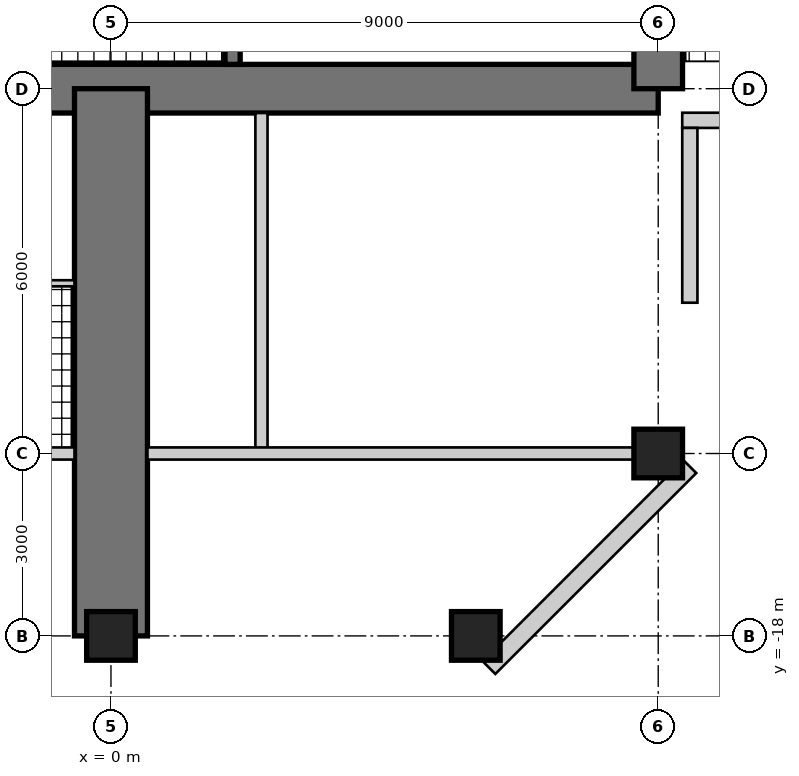
"""IFC4 building model, lengths in metres.
Left out: names, types, materials, properties, quantities, classifications, styles, units other than length and angle.
Written with IfcOpenShell. Run it as: python <this file> out.ifc"""

import sys

from ifc_helpers import new_model, si_unit, direction, frame, frame_2d, origin, origin_2d, place, context, subcontext, project, spatial, rectangle, hollow_rectangle, extrude, element, fill, save


model = new_model("IFC4")
c1 = context("Model", 3, precision=1e-05, world=origin(), true_north=direction((0.0, 1.0)))
c2 = subcontext(c1, "Body", "Model", "MODEL_VIEW")
j1 = project(units=[si_unit("LENGTHUNIT", "METRE"), si_unit("PLANEANGLEUNIT", "RADIAN")], contexts=[c1])
p1 = place(None, origin())
s1 = spatial("IfcSite", under=j1, at=p1, CompositionType="ELEMENT")
p2 = place(p1, origin())
s2 = spatial("IfcBuilding", under=s1, at=p2, CompositionType="ELEMENT")
p3 = place(p2, frame((0.0, 0.0, 242.5)))
s3 = spatial("IfcBuildingStorey", under=s2, at=p3, CompositionType="ELEMENT", Elevation=242.5)
p4 = place(p3, frame((-9.0, -9.0, 0.0), z_axis=(0.0, 0.0, 1.0), x_axis=(1.0, 0.0, 0.0)))
e1 = element("IfcWall", 1, at=p4, inside=s3, PredefinedType="SHEAR", context=c2, shape_type="SweptSolid", body=[
    extrude(rectangle(XDim=18.0, YDim=0.8, at=frame_2d((9.0, 0.0))), origin(), (0.0, 0.0, 1.0), 3.4),
])
p5 = place(p4, frame((9.8, 0.0, 0.0)))
e2 = element("IfcOpeningElement", 2, at=p5, cuts=e1, PredefinedType="OPENING", context=c2, shape_type="SweptSolid", body=[
    extrude(rectangle(XDim=1.0, YDim=2.4, at=frame_2d((0.5, 1.2))), frame((0.0, 0.41, 0.0), z_axis=(0.0, -1.0, 0.0), x_axis=(1.0, 0.0, 0.0)), (0.0, 0.0, 1.0), 0.82),
])
p6 = place(p3, frame((9.0, -9.0, 0.0), z_axis=(0.0, 0.0, 1.0), x_axis=(0.0, 1.0, 0.0)))
e3 = element("IfcWall", 3, at=p6, inside=s3, PredefinedType="SHEAR", context=c2, shape_type="SweptSolid", body=[
    extrude(rectangle(XDim=18.0, YDim=0.8, at=frame_2d((9.0, 0.0))), origin(), (0.0, 0.0, 1.0), 3.4),
])
p7 = place(p6, frame((9.8, 0.0, 0.0)))
e4 = element("IfcOpeningElement", 4, at=p7, cuts=e3, PredefinedType="OPENING", context=c2, shape_type="SweptSolid", body=[
    extrude(rectangle(XDim=1.0, YDim=2.4, at=frame_2d((0.5, 1.2))), frame((0.0, 0.41, 0.0), z_axis=(0.0, -1.0, 0.0), x_axis=(1.0, 0.0, 0.0)), (0.0, 0.0, 1.0), 0.82),
])
p8 = place(p3, frame((2.0, -1.675, 0.0), z_axis=(0.0, 0.0, 1.0), x_axis=(0.0, -1.0, 0.0)))
e5 = element("IfcWall", 5, at=p8, inside=s3, PredefinedType="SHEAR", context=c2, shape_type="SweptSolid", body=[
    extrude(rectangle(XDim=6.925, YDim=0.25, at=frame_2d((3.462, 0.0))), origin(), (0.0, 0.0, 1.0), 3.4),
])
p9 = place(p8, frame((0.725, 0.0, 0.0)))
e6 = element("IfcOpeningElement", 6, at=p9, cuts=e5, PredefinedType="OPENING", context=c2, shape_type="SweptSolid", body=[
    extrude(rectangle(XDim=1.0, YDim=2.1, at=frame_2d((0.5, 1.05))), frame((0.0, 0.135, 0.0), z_axis=(0.0, -1.0, 0.0), x_axis=(1.0, 0.0, 0.0)), (0.0, 0.0, 1.0), 0.27),
])
p10 = place(p3, frame((0.0, -9.0, 0.0), z_axis=(0.0, 0.0, 1.0), x_axis=(0.0, -1.0, 0.0)))
e7 = element("IfcWall", 7, at=p10, inside=s3, PredefinedType="SHEAR", context=c2, shape_type="SweptSolid", body=[
    extrude(rectangle(XDim=9.0, YDim=1.2, at=frame_2d((4.5, 0.0))), origin(), (0.0, 0.0, 1.0), 3.4),
])
p11 = place(p10, frame((3.8, 0.0, 0.0)))
e8 = element("IfcOpeningElement", 8, at=p11, cuts=e7, PredefinedType="OPENING", context=c2, shape_type="SweptSolid", body=[
    extrude(rectangle(XDim=1.0, YDim=2.15, at=frame_2d((0.5, 1.075))), frame((0.0, 0.61, 0.0), z_axis=(0.0, -1.0, 0.0), x_axis=(1.0, 0.0, 0.0)), (0.0, 0.0, 1.0), 1.22),
])
p12 = place(p10, frame((7.0, 0.0, 0.0)))
e9 = element("IfcOpeningElement", 9, at=p12, cuts=e7, PredefinedType="OPENING", context=c2, shape_type="SweptSolid", body=[
    extrude(rectangle(XDim=1.0, YDim=2.2, at=frame_2d((0.5, 1.1))), frame((0.0, 0.61, 0.0), z_axis=(0.0, -1.0, 0.0), x_axis=(1.0, 0.0, 0.0)), (0.0, 0.0, 1.0), 1.22),
])
for number, where, z_axis, x_axis in (
    (10, (9.0, -15.0, 0.0), (0.0, 0.0, 1.0), (1.0, 0.0, 0.0)),
    (11, (0.0, -18.0, 0.0), (0.0, 0.0, 1.0), (1.0, 0.0, 0.0)),
    (12, (6.0, -18.0, 0.0), (0.0, 0.0, 1.0), (1.0, 0.0, 0.0)),
):
    element("IfcColumn", number, at=place(p3, frame(where, z_axis=z_axis, x_axis=x_axis)), inside=s3, PredefinedType="COLUMN", context=c2, shape_type="SweptSolid", body=[
        extrude(rectangle(XDim=0.8, YDim=0.8, at=origin_2d()), origin(), (0.0, 0.0, 1.0), 3.4),
    ])
p13 = place(p3, frame((9.395, -9.52, 0.0), z_axis=(0.0, 0.0, 1.0), x_axis=(1.0, 0.0, 0.0)))
e13 = element("IfcWall", 13, at=p13, inside=s3, PredefinedType="SOLIDWALL", context=c2, shape_type="SweptSolid", body=[
    extrude(rectangle(XDim=3.125, YDim=0.25, at=frame_2d((1.562, 0.0))), origin(), (0.0, 0.0, 1.0), 3.22),
])
p14 = place(p13, frame((0.6, 0.0, 0.0)))
e14 = element("IfcOpeningElement", 14, at=p14, cuts=e13, PredefinedType="OPENING", context=c2, shape_type="SweptSolid", body=[
    extrude(rectangle(XDim=1.0, YDim=2.2, at=frame_2d((0.5, 1.1))), frame((0.0, 0.135, 0.0), z_axis=(0.0, -1.0, 0.0), x_axis=(1.0, 0.0, 0.0)), (0.0, 0.0, 1.0), 0.27),
])
p15 = place(p3, frame((6.215, -18.52, 0.0), z_axis=(0.0, 0.0, 1.0), x_axis=(0.707106781187, 0.707106781187, 0.0)))
e15 = element("IfcWall", 15, at=p15, inside=s3, PredefinedType="SOLIDWALL", context=c2, shape_type="SweptSolid", body=[
    extrude(rectangle(XDim=4.674, YDim=0.3, at=frame_2d((2.337, 0.0))), origin(), (0.0, 0.0, 1.0), 3.22),
])
p16 = place(p15, frame((1.887, 0.0, 0.3)))
e16 = element("IfcOpeningElement", 16, at=p16, cuts=e15, PredefinedType="OPENING", context=c2, shape_type="SweptSolid", body=[
    extrude(rectangle(XDim=0.9, YDim=2.4, at=frame_2d((0.45, 1.2))), frame((0.0, 0.16, 0.0), z_axis=(0.0, -1.0, 0.0), x_axis=(1.0, 0.0, 0.0)), (0.0, 0.0, 1.0), 0.32),
])
p17 = place(p3, frame((9.52, -12.52, 0.0), z_axis=(0.0, 0.0, 1.0), x_axis=(0.0, 1.0, 0.0)))
e17 = element("IfcWall", 17, at=p17, inside=s3, PredefinedType="SOLIDWALL", context=c2, shape_type="SweptSolid", body=[
    extrude(rectangle(XDim=2.875, YDim=0.25, at=frame_2d((1.438, 0.0))), origin(), (0.0, 0.0, 1.0), 3.22),
])
p18 = place(p17, frame((0.6, 0.0, 0.0)))
e18 = element("IfcOpeningElement", 18, at=p18, cuts=e17, PredefinedType="OPENING", context=c2, shape_type="SweptSolid", body=[
    extrude(rectangle(XDim=1.0, YDim=2.2, at=frame_2d((0.5, 1.1))), frame((0.0, 0.135, 0.0), z_axis=(0.0, -1.0, 0.0), x_axis=(1.0, 0.0, 0.0)), (0.0, 0.0, 1.0), 0.27),
])
p19 = place(p3, frame((-3.2, -12.2, 0.0), z_axis=(0.0, 0.0, 1.0), x_axis=(1.0, 0.0, 0.0)))
e19 = element("IfcWall", 19, at=p19, inside=s3, PredefinedType="PARTITIONING", context=c2, shape_type="SweptSolid", body=[
    extrude(rectangle(XDim=2.6, YDim=0.1, at=frame_2d((1.3, 0.0))), origin(), (0.0, 0.0, 1.0), 3.22),
])
p20 = place(p19, frame((0.55, 0.0, 0.0)))
e20 = element("IfcOpeningElement", 20, at=p20, cuts=e19, PredefinedType="OPENING", context=c2, shape_type="SweptSolid", body=[
    extrude(rectangle(XDim=0.9, YDim=2.1, at=frame_2d((0.45, 1.05))), frame((0.0, 0.06, 0.0), z_axis=(0.0, -1.0, 0.0), x_axis=(1.0, 0.0, 0.0)), (0.0, 0.0, 1.0), 0.12),
])
p21 = place(p3, frame((2.475, -9.4, 0.0), z_axis=(0.0, 0.0, 1.0), x_axis=(0.0, -1.0, 0.0)))
e21 = element("IfcWall", 21, at=p21, inside=s3, PredefinedType="SOLIDWALL", context=c2, shape_type="SweptSolid", body=[
    extrude(rectangle(XDim=5.6, YDim=0.2, at=frame_2d((2.8, 0.0))), origin(), (0.0, 0.0, 1.0), 3.22),
])
p22 = place(p21, frame((1.2, 0.0, 0.0)))
e22 = element("IfcOpeningElement", 22, at=p22, cuts=e21, PredefinedType="OPENING", context=c2, shape_type="SweptSolid", body=[
    extrude(rectangle(XDim=1.0, YDim=2.2, at=frame_2d((0.5, 1.1))), frame((0.0, 0.11, 0.0), z_axis=(0.0, -1.0, 0.0), x_axis=(1.0, 0.0, 0.0)), (0.0, 0.0, 1.0), 0.22),
])
p23 = place(p3, frame((-8.6, -15.0, 0.0), z_axis=(0.0, 0.0, 1.0), x_axis=(1.0, 0.0, 0.0)))
e23 = element("IfcWall", 23, at=p23, inside=s3, PredefinedType="SOLIDWALL", context=c2, shape_type="SweptSolid", body=[
    extrude(rectangle(XDim=8.0, YDim=0.2, at=frame_2d((4.0, 0.0))), origin(), (0.0, 0.0, 1.0), 2.52),
])
p24 = place(p3, frame((0.6, -15.0, 0.0), z_axis=(0.0, 0.0, 1.0), x_axis=(1.0, 0.0, 0.0)))
e24 = element("IfcWall", 24, at=p24, inside=s3, PredefinedType="SOLIDWALL", context=c2, shape_type="SweptSolid", body=[
    extrude(rectangle(XDim=8.0, YDim=0.2, at=frame_2d((4.0, 0.0))), origin(), (0.0, 0.0, 1.0), 2.52),
])
p25 = place(p24, frame((0.35, 0.0, 0.0)))
e25 = element("IfcOpeningElement", 25, at=p25, cuts=e24, PredefinedType="OPENING", context=c2, shape_type="SweptSolid", body=[
    extrude(rectangle(XDim=1.0, YDim=2.2, at=frame_2d((0.5, 1.1))), frame((0.0, 0.11, 0.0), z_axis=(0.0, -1.0, 0.0), x_axis=(1.0, 0.0, 0.0)), (0.0, 0.0, 1.0), 0.22),
])
p26 = place(p14, origin())
e26 = element("IfcDoor", 26, at=p26, inside=s3, OperationType="SINGLE_SWING_RIGHT", PredefinedType="DOOR", context=c2, shape_type="SweptSolid", body=[
    extrude(hollow_rectangle(XDim=1.0, YDim=2.2, WallThickness=0.06, at=frame_2d((0.5, 1.1))), frame((0.0, 0.025, 0.0), z_axis=(0.0, -1.0, 0.0), x_axis=(1.0, 0.0, 0.0)), (0.0, 0.0, 1.0), 0.05),
    extrude(rectangle(XDim=0.879, YDim=2.079, at=frame_2d((0.5, 1.1))), frame((0.0, 0.025, 0.0), z_axis=(0.0, -1.0, 0.0), x_axis=(1.0, 0.0, 0.0)), (0.0, 0.0, 1.0), 0.05),
])
fill(e14, e26)
p27 = place(p16, origin())
e27 = element("IfcWindow", 27, at=p27, inside=s3, PartitioningType="SINGLE_PANEL", PredefinedType="WINDOW", context=c2, shape_type="SweptSolid", body=[
    extrude(hollow_rectangle(XDim=0.9, YDim=2.4, WallThickness=0.06, at=frame_2d((0.45, 1.2))), frame((0.0, 0.03, 0.0), z_axis=(0.0, -1.0, 0.0), x_axis=(1.0, 0.0, 0.0)), (0.0, 0.0, 1.0), 0.06),
    extrude(rectangle(XDim=0.779, YDim=2.279, at=frame_2d((0.45, 1.2))), frame((0.0, 0.03, 0.0), z_axis=(0.0, -1.0, 0.0), x_axis=(1.0, 0.0, 0.0)), (0.0, 0.0, 1.0), 0.06),
])
fill(e16, e27)
p28 = place(p18, origin())
e28 = element("IfcDoor", 28, at=p28, inside=s3, OperationType="SINGLE_SWING_RIGHT", PredefinedType="DOOR", context=c2, shape_type="SweptSolid", body=[
    extrude(hollow_rectangle(XDim=1.0, YDim=2.2, WallThickness=0.06, at=frame_2d((0.5, 1.1))), frame((0.0, 0.025, 0.0), z_axis=(0.0, -1.0, 0.0), x_axis=(1.0, 0.0, 0.0)), (0.0, 0.0, 1.0), 0.05),
    extrude(rectangle(XDim=0.879, YDim=2.079, at=frame_2d((0.5, 1.1))), frame((0.0, 0.025, 0.0), z_axis=(0.0, -1.0, 0.0), x_axis=(1.0, 0.0, 0.0)), (0.0, 0.0, 1.0), 0.05),
])
fill(e18, e28)
p29 = place(p22, origin())
e29 = element("IfcDoor", 29, at=p29, inside=s3, OperationType="SINGLE_SWING_LEFT", PredefinedType="DOOR", context=c2, shape_type="SweptSolid", body=[
    extrude(rectangle(XDim=1.0, YDim=2.2, at=frame_2d((0.5, 1.1))), frame((0.0, 0.025, 0.0), z_axis=(0.0, -1.0, 0.0), x_axis=(1.0, 0.0, 0.0)), (0.0, 0.0, 1.0), 0.05),
])
fill(e22, e29)
p30 = place(p25, frame((1.0, 0.0, 0.0), z_axis=(0.0, 0.0, 1.0), x_axis=(-1.0, 0.0, 0.0)))
e30 = element("IfcDoor", 30, at=p30, inside=s3, OperationType="SINGLE_SWING_RIGHT", PredefinedType="DOOR", context=c2, shape_type="SweptSolid", body=[
    extrude(rectangle(XDim=1.0, YDim=2.2, at=frame_2d((0.5, 1.1))), frame((0.0, 0.025, 0.0), z_axis=(0.0, -1.0, 0.0), x_axis=(1.0, 0.0, 0.0)), (0.0, 0.0, 1.0), 0.05),
])
fill(e25, e30)
p31 = place(p11, frame((1.0, 0.0, 0.0), z_axis=(0.0, 0.0, 1.0), x_axis=(-1.0, 0.0, 0.0)))
e31 = element("IfcDoor", 31, at=p31, inside=s3, OperationType="SINGLE_SWING_RIGHT", PredefinedType="DOOR", context=c2, shape_type="SweptSolid", body=[
    extrude(rectangle(XDim=1.0, YDim=2.15, at=frame_2d((0.5, 1.075))), frame((0.0, 0.025, 0.0), z_axis=(0.0, -1.0, 0.0), x_axis=(1.0, 0.0, 0.0)), (0.0, 0.0, 1.0), 0.05),
])
fill(e8, e31)
p32 = place(p12, frame((1.0, 0.0, 0.0), z_axis=(0.0, 0.0, 1.0), x_axis=(-1.0, 0.0, 0.0)))
e32 = element("IfcDoor", 32, at=p32, inside=s3, OperationType="SINGLE_SWING_RIGHT", PredefinedType="DOOR", context=c2, shape_type="SweptSolid", body=[
    extrude(rectangle(XDim=1.0, YDim=2.2, at=frame_2d((0.5, 1.1))), frame((0.0, 0.025, 0.0), z_axis=(0.0, -1.0, 0.0), x_axis=(1.0, 0.0, 0.0)), (0.0, 0.0, 1.0), 0.05),
])
fill(e9, e32)
p33 = place(p5, origin())
e33 = element("IfcDoor", 33, at=p33, inside=s3, OperationType="SINGLE_SWING_RIGHT", PredefinedType="DOOR", context=c2, shape_type="SweptSolid", body=[
    extrude(rectangle(XDim=1.0, YDim=2.4, at=frame_2d((0.5, 1.2))), frame((0.0, 0.055, 0.0), z_axis=(0.0, -1.0, 0.0), x_axis=(1.0, 0.0, 0.0)), (0.0, 0.0, 1.0), 0.05),
])
fill(e2, e33)
save(model, sys.argv[1])
